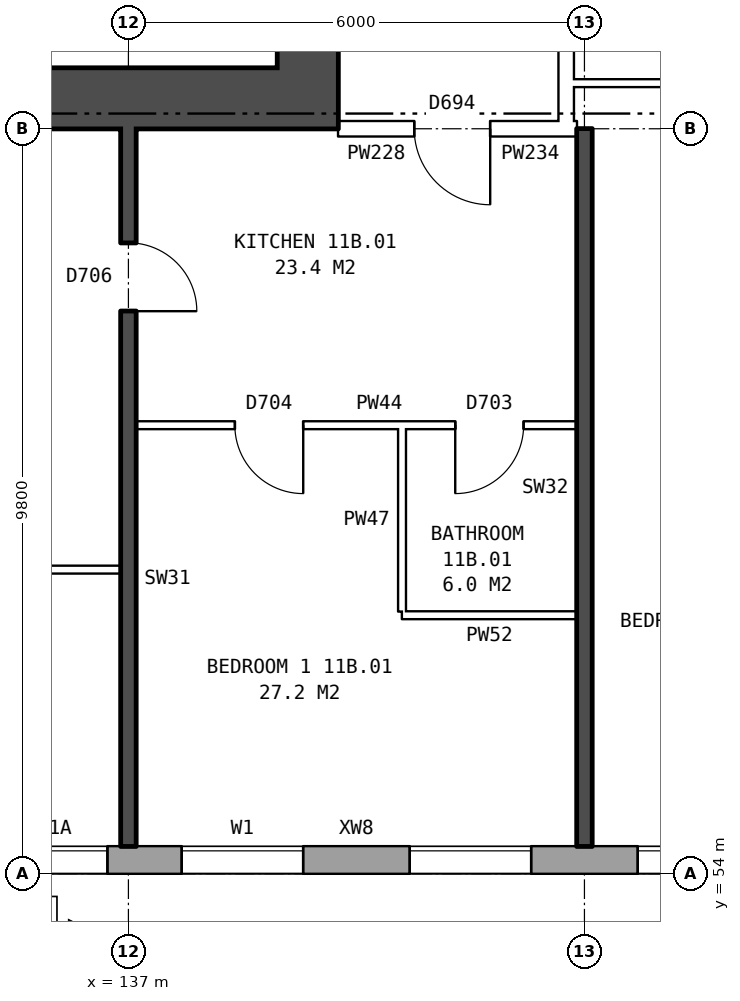
"""IFC4 building model, lengths in metres.
Left out: names, types, materials, properties, quantities, classifications, styles, units other than length and angle.
Written with IfcOpenShell. Run it as: python <this file> out.ifc"""

import sys

from ifc_helpers import new_model, si_unit, direction, frame, frame_2d, origin, place, context, subcontext, project, spatial, rectangle, extrude, element, fill, save


model = new_model("IFC4")
c1 = context("Model", 3, precision=1e-05, world=origin(), true_north=direction((0.0, 1.0)))
c2 = subcontext(c1, "Body", "Model", "MODEL_VIEW")
j1 = project(units=[si_unit("LENGTHUNIT", "METRE"), si_unit("PLANEANGLEUNIT", "RADIAN")], contexts=[c1])
p1 = place(None, origin())
s1 = spatial("IfcSite", under=j1, at=p1, CompositionType="ELEMENT")
p2 = place(p1, origin())
s2 = spatial("IfcBuilding", under=s1, at=p2, CompositionType="ELEMENT")
p3 = place(p2, frame((0.0, 0.0, 44.3)))
s3 = spatial("IfcBuildingStorey", under=s2, at=p3, CompositionType="ELEMENT", Elevation=44.3)
p4 = place(p3, frame((134.075, 54.18, 0.0), z_axis=(0.0, 0.0, 1.0), x_axis=(1.0, 0.0, 0.0)))
e1 = element("IfcWall", 1, at=p4, inside=s3, PredefinedType="STANDARD", context=c2, shape_type="SweptSolid", body=[
    extrude(rectangle(XDim=39.351, YDim=0.36, at=frame_2d((19.675, 0.0))), origin(), (0.0, 0.0, 1.0), 2.85),
])
p5 = place(p4, frame((0.3, 0.0, 0.8)))
e2 = element("IfcOpeningElement", 2, at=p5, cuts=e1, PredefinedType="OPENING", context=c2, shape_type="SweptSolid", body=[
    extrude(rectangle(XDim=0.6, YDim=0.9, at=frame_2d((0.3, 0.45))), frame((0.0, 0.19, 0.0), z_axis=(0.0, -1.0, 0.0), x_axis=(1.0, 0.0, 0.0)), (0.0, 0.0, 1.0), 0.38),
])
p6 = place(p4, frame((3.625, 0.0, 0.8)))
e3 = element("IfcOpeningElement", 3, at=p6, cuts=e1, PredefinedType="OPENING", context=c2, shape_type="SweptSolid", body=[
    extrude(rectangle(XDim=1.6, YDim=1.8, at=frame_2d((0.8, 0.9))), frame((0.0, 0.19, 0.0), z_axis=(0.0, -1.0, 0.0), x_axis=(1.0, 0.0, 0.0)), (0.0, 0.0, 1.0), 0.38),
])
p7 = place(p4, frame((6.625, 0.0, 0.8)))
e4 = element("IfcOpeningElement", 4, at=p7, cuts=e1, PredefinedType="OPENING", context=c2, shape_type="SweptSolid", body=[
    extrude(rectangle(XDim=1.6, YDim=1.8, at=frame_2d((0.8, 0.9))), frame((0.0, 0.19, 0.0), z_axis=(0.0, -1.0, 0.0), x_axis=(1.0, 0.0, 0.0)), (0.0, 0.0, 1.0), 0.38),
])
p8 = place(p4, frame((9.625, 0.0, 0.8)))
e5 = element("IfcOpeningElement", 5, at=p8, cuts=e1, PredefinedType="OPENING", context=c2, shape_type="SweptSolid", body=[
    extrude(rectangle(XDim=1.6, YDim=1.8, at=frame_2d((0.8, 0.9))), frame((0.0, 0.19, 0.0), z_axis=(0.0, -1.0, 0.0), x_axis=(1.0, 0.0, 0.0)), (0.0, 0.0, 1.0), 0.38),
])
p9 = place(p4, frame((12.625, 0.0, 0.8)))
e6 = element("IfcOpeningElement", 6, at=p9, cuts=e1, PredefinedType="OPENING", context=c2, shape_type="SweptSolid", body=[
    extrude(rectangle(XDim=1.6, YDim=1.8, at=frame_2d((0.8, 0.9))), frame((0.0, 0.19, 0.0), z_axis=(0.0, -1.0, 0.0), x_axis=(1.0, 0.0, 0.0)), (0.0, 0.0, 1.0), 0.38),
])
p10 = place(p4, frame((15.625, 0.0, 0.8)))
e7 = element("IfcOpeningElement", 7, at=p10, cuts=e1, PredefinedType="OPENING", context=c2, shape_type="SweptSolid", body=[
    extrude(rectangle(XDim=1.6, YDim=1.8, at=frame_2d((0.8, 0.9))), frame((0.0, 0.19, 0.0), z_axis=(0.0, -1.0, 0.0), x_axis=(1.0, 0.0, 0.0)), (0.0, 0.0, 1.0), 0.38),
])
p11 = place(p4, frame((18.625, 0.0, 0.8)))
e8 = element("IfcOpeningElement", 8, at=p11, cuts=e1, PredefinedType="OPENING", context=c2, shape_type="SweptSolid", body=[
    extrude(rectangle(XDim=1.6, YDim=1.8, at=frame_2d((0.8, 0.9))), frame((0.0, 0.19, 0.0), z_axis=(0.0, -1.0, 0.0), x_axis=(1.0, 0.0, 0.0)), (0.0, 0.0, 1.0), 0.38),
])
p12 = place(p4, frame((21.625, 0.0, 0.8)))
e9 = element("IfcOpeningElement", 9, at=p12, cuts=e1, PredefinedType="OPENING", context=c2, shape_type="SweptSolid", body=[
    extrude(rectangle(XDim=1.6, YDim=1.8, at=frame_2d((0.8, 0.9))), frame((0.0, 0.19, 0.0), z_axis=(0.0, -1.0, 0.0), x_axis=(1.0, 0.0, 0.0)), (0.0, 0.0, 1.0), 0.38),
])
p13 = place(p4, frame((24.625, 0.0, 0.8)))
e10 = element("IfcOpeningElement", 10, at=p13, cuts=e1, PredefinedType="OPENING", context=c2, shape_type="SweptSolid", body=[
    extrude(rectangle(XDim=1.6, YDim=1.8, at=frame_2d((0.8, 0.9))), frame((0.0, 0.19, 0.0), z_axis=(0.0, -1.0, 0.0), x_axis=(1.0, 0.0, 0.0)), (0.0, 0.0, 1.0), 0.38),
])
p14 = place(p4, frame((27.625, 0.0, 0.8)))
e11 = element("IfcOpeningElement", 11, at=p14, cuts=e1, PredefinedType="OPENING", context=c2, shape_type="SweptSolid", body=[
    extrude(rectangle(XDim=1.6, YDim=1.8, at=frame_2d((0.8, 0.9))), frame((0.0, 0.19, 0.0), z_axis=(0.0, -1.0, 0.0), x_axis=(1.0, 0.0, 0.0)), (0.0, 0.0, 1.0), 0.38),
])
p15 = place(p4, frame((30.625, 0.0, 0.8)))
e12 = element("IfcOpeningElement", 12, at=p15, cuts=e1, PredefinedType="OPENING", context=c2, shape_type="SweptSolid", body=[
    extrude(rectangle(XDim=1.6, YDim=1.8, at=frame_2d((0.8, 0.9))), frame((0.0, 0.19, 0.0), z_axis=(0.0, -1.0, 0.0), x_axis=(1.0, 0.0, 0.0)), (0.0, 0.0, 1.0), 0.38),
])
p16 = place(p4, frame((33.625, 0.0, 0.8)))
e13 = element("IfcOpeningElement", 13, at=p16, cuts=e1, PredefinedType="OPENING", context=c2, shape_type="SweptSolid", body=[
    extrude(rectangle(XDim=1.6, YDim=1.8, at=frame_2d((0.8, 0.9))), frame((0.0, 0.19, 0.0), z_axis=(0.0, -1.0, 0.0), x_axis=(1.0, 0.0, 0.0)), (0.0, 0.0, 1.0), 0.38),
])
p17 = place(p4, frame((36.625, 0.0, 0.8)))
e14 = element("IfcOpeningElement", 14, at=p17, cuts=e1, PredefinedType="OPENING", context=c2, shape_type="SweptSolid", body=[
    extrude(rectangle(XDim=1.6, YDim=1.8, at=frame_2d((0.8, 0.9))), frame((0.0, 0.19, 0.0), z_axis=(0.0, -1.0, 0.0), x_axis=(1.0, 0.0, 0.0)), (0.0, 0.0, 1.0), 0.38),
])
p18 = place(p4, frame((1.25, 0.0, 0.8)))
e15 = element("IfcOpeningElement", 15, at=p18, cuts=e1, PredefinedType="OPENING", context=c2, shape_type="SweptSolid", body=[
    extrude(rectangle(XDim=1.4, YDim=1.8, at=frame_2d((0.7, 0.9))), frame((0.0, 0.19, 0.0), z_axis=(0.0, -1.0, 0.0), x_axis=(1.0, 0.0, 0.0)), (0.0, 0.0, 1.0), 0.38),
])
p19 = place(p3, frame((139.36, 64.6, 0.0), z_axis=(0.0, 0.0, 1.0), x_axis=(0.0, 1.0, 0.0)))
e16 = element("IfcWall", 16, at=p19, inside=s3, PredefinedType="SHEAR", context=c2, shape_type="SweptSolid", body=[
    extrude(rectangle(XDim=10.8, YDim=0.8, at=frame_2d((5.4, 0.0))), origin(), (0.0, 0.0, 1.0), 2.85),
])
p20 = place(p19, frame((0.525, 0.0, 0.0)))
e17 = element("IfcOpeningElement", 17, at=p20, cuts=e16, PredefinedType="OPENING", context=c2, shape_type="SweptSolid", body=[
    extrude(rectangle(XDim=1.1, YDim=2.1, at=frame_2d((0.55, 1.05))), frame((0.0, 0.41, 0.0), z_axis=(0.0, -1.0, 0.0), x_axis=(1.0, 0.0, 0.0)), (0.0, 0.0, 1.0), 0.82),
])
p21 = place(p19, frame((9.1, 0.0, 0.0)))
e18 = element("IfcOpeningElement", 18, at=p21, cuts=e16, PredefinedType="OPENING", context=c2, shape_type="SweptSolid", body=[
    extrude(rectangle(XDim=1.1, YDim=2.1, at=frame_2d((0.55, 1.05))), frame((0.0, 0.41, 0.0), z_axis=(0.0, -1.0, 0.0), x_axis=(1.0, 0.0, 0.0)), (0.0, 0.0, 1.0), 0.82),
])
p22 = place(p19, frame((7.325, 0.0, 0.0)))
e19 = element("IfcOpeningElement", 19, at=p22, cuts=e16, PredefinedType="OPENING", context=c2, shape_type="SweptSolid", body=[
    extrude(rectangle(XDim=0.85, YDim=2.1, at=frame_2d((0.425, 1.05))), frame((0.0, 0.41, 0.0), z_axis=(0.0, -1.0, 0.0), x_axis=(1.0, 0.0, 0.0)), (0.0, 0.0, 1.0), 0.82),
])
p23 = place(p3, frame((139.76, 64.2, 0.0), z_axis=(0.0, 0.0, 1.0), x_axis=(-1.0, 0.0, 0.0)))
e20 = element("IfcWall", 20, at=p23, inside=s3, PredefinedType="SHEAR", context=c2, shape_type="SweptSolid", body=[
    extrude(rectangle(XDim=8.4, YDim=0.8, at=frame_2d((4.2, 0.0))), origin(), (0.0, 0.0, 1.0), 2.85),
])
p24 = place(p3, frame((142.76, 63.9, 0.0), z_axis=(0.0, 0.0, 1.0), x_axis=(0.0, 1.0, 0.0)))
e21 = element("IfcWall", 21, at=p24, inside=s3, PredefinedType="PARTITIONING", context=c2, shape_type="SweptSolid", body=[
    extrude(rectangle(XDim=12.2, YDim=0.2, at=frame_2d((6.1, 0.0))), origin(), (0.0, 0.0, 1.0), 2.85),
])
p25 = place(p24, frame((5.1, 0.0, 0.0)))
e22 = element("IfcOpeningElement", 22, at=p25, cuts=e21, PredefinedType="OPENING", context=c2, shape_type="SweptSolid", body=[
    extrude(rectangle(XDim=2.0, YDim=2.1, at=frame_2d((1.0, 1.05))), frame((0.0, 0.11, 0.0), z_axis=(0.0, -1.0, 0.0), x_axis=(1.0, 0.0, 0.0)), (0.0, 0.0, 1.0), 0.22),
])
p26 = place(p3, frame((140.6, 57.4, 0.0), z_axis=(0.0, 0.0, 1.0), x_axis=(1.0, 0.0, 0.0)))
e23 = element("IfcWall", 23, at=p26, inside=s3, PredefinedType="PARTITIONING", context=c2, shape_type="SweptSolid", body=[
    extrude(rectangle(XDim=2.3, YDim=0.1, at=frame_2d((1.15, 0.0))), origin(), (0.0, 0.0, 1.0), 2.85),
])
p27 = place(p3, frame((131.36, 58.0, 0.0), z_axis=(0.0, 0.0, 1.0), x_axis=(1.0, 0.0, 0.0)))
e24 = element("IfcWall", 24, at=p27, inside=s3, PredefinedType="PARTITIONING", context=c2, shape_type="SweptSolid", body=[
    extrude(rectangle(XDim=5.54, YDim=0.1, at=frame_2d((2.77, 0.0))), origin(), (0.0, 0.0, 1.0), 2.85),
])
p28 = place(p27, frame((2.32, 0.0, 0.0)))
e25 = element("IfcOpeningElement", 25, at=p28, cuts=e24, PredefinedType="OPENING", context=c2, shape_type="SweptSolid", body=[
    extrude(rectangle(XDim=0.9, YDim=2.1, at=frame_2d((0.45, 1.05))), frame((0.0, 0.06, 0.0), z_axis=(0.0, -1.0, 0.0), x_axis=(1.0, 0.0, 0.0)), (0.0, 0.0, 1.0), 0.12),
])
p29 = place(p3, frame((137.1, 59.9, 0.0), z_axis=(0.0, 0.0, 1.0), x_axis=(1.0, 0.0, 0.0)))
e26 = element("IfcWall", 26, at=p29, inside=s3, PredefinedType="PARTITIONING", context=c2, shape_type="SweptSolid", body=[
    extrude(rectangle(XDim=5.8, YDim=0.1, at=frame_2d((2.9, 0.0))), origin(), (0.0, 0.0, 1.0), 2.85),
])
p30 = place(p29, frame((1.3, 0.0, 0.0)))
e27 = element("IfcOpeningElement", 27, at=p30, cuts=e26, PredefinedType="OPENING", context=c2, shape_type="SweptSolid", body=[
    extrude(rectangle(XDim=0.9, YDim=2.1, at=frame_2d((0.45, 1.05))), frame((0.0, 0.06, 0.0), z_axis=(0.0, -1.0, 0.0), x_axis=(1.0, 0.0, 0.0)), (0.0, 0.0, 1.0), 0.12),
])
p31 = place(p29, frame((4.2, 0.0, 0.0)))
e28 = element("IfcOpeningElement", 28, at=p31, cuts=e26, PredefinedType="OPENING", context=c2, shape_type="SweptSolid", body=[
    extrude(rectangle(XDim=0.9, YDim=2.1, at=frame_2d((0.45, 1.05))), frame((0.0, 0.06, 0.0), z_axis=(0.0, -1.0, 0.0), x_axis=(1.0, 0.0, 0.0)), (0.0, 0.0, 1.0), 0.12),
])
p32 = place(p3, frame((139.76, 63.8, 0.0), z_axis=(0.0, 0.0, 1.0), x_axis=(1.0, 0.0, 0.0)))
e29 = element("IfcWall", 29, at=p32, inside=s3, PredefinedType="PARTITIONING", context=c2, shape_type="SweptSolid", body=[
    extrude(rectangle(XDim=3.0, YDim=0.2, at=frame_2d((1.5, 0.0))), origin(), (0.0, 0.0, 1.0), 2.85),
])
p33 = place(p32, frame((1.0, 0.0, 0.0)))
e30 = element("IfcOpeningElement", 30, at=p33, cuts=e29, PredefinedType="OPENING", context=c2, shape_type="SweptSolid", body=[
    extrude(rectangle(XDim=1.0, YDim=2.1, at=frame_2d((0.5, 1.05))), frame((0.0, 0.11, 0.0), z_axis=(0.0, -1.0, 0.0), x_axis=(1.0, 0.0, 0.0)), (0.0, 0.0, 1.0), 0.22),
])
p34 = place(p3, frame((142.76, 63.8, 0.0), z_axis=(0.0, 0.0, 1.0), x_axis=(1.0, 0.0, 0.0)))
e31 = element("IfcWall", 31, at=p34, inside=s3, PredefinedType="PARTITIONING", context=c2, shape_type="SweptSolid", body=[
    extrude(rectangle(XDim=0.14, YDim=0.2, at=frame_2d((0.07, 0.0))), origin(), (0.0, 0.0, 1.0), 2.85),
])
p35 = place(p3, frame((142.76, 64.4, 0.0), z_axis=(0.0, 0.0, 1.0), x_axis=(1.0, 0.0, 0.0)))
e32 = element("IfcWall", 32, at=p35, inside=s3, PredefinedType="PARTITIONING", context=c2, shape_type="SweptSolid", body=[
    extrude(rectangle(XDim=3.24, YDim=0.1, at=frame_2d((1.62, 0.0))), origin(), (0.0, 0.0, 1.0), 2.85),
])
p36 = place(p3, frame((137.0, 54.36, 0.0), z_axis=(0.0, 0.0, 1.0), x_axis=(0.0, 1.0, 0.0)))
e33 = element("IfcWall", 33, at=p36, inside=s3, PredefinedType="SOLIDWALL", context=c2, shape_type="SweptSolid", body=[
    extrude(rectangle(XDim=9.44, YDim=0.2, at=frame_2d((4.72, 0.0))), origin(), (0.0, 0.0, 1.0), 2.85),
])
p37 = place(p36, frame((7.04, 0.0, 0.0)))
e34 = element("IfcOpeningElement", 34, at=p37, cuts=e33, PredefinedType="OPENING", context=c2, shape_type="SweptSolid", body=[
    extrude(rectangle(XDim=0.9, YDim=2.1, at=frame_2d((0.45, 1.05))), frame((0.0, 0.11, 0.0), z_axis=(0.0, -1.0, 0.0), x_axis=(1.0, 0.0, 0.0)), (0.0, 0.0, 1.0), 0.22),
])
p38 = place(p3, frame((140.6, 57.45, 0.0), z_axis=(0.0, 0.0, 1.0), x_axis=(0.0, 1.0, 0.0)))
e35 = element("IfcWall", 35, at=p38, inside=s3, PredefinedType="PARTITIONING", context=c2, shape_type="SweptSolid", body=[
    extrude(rectangle(XDim=2.4, YDim=0.1, at=frame_2d((1.2, 0.0))), origin(), (0.0, 0.0, 1.0), 2.85),
])
p39 = place(p3, frame((143.0, 54.36, 0.0), z_axis=(0.0, 0.0, 1.0), x_axis=(0.0, 1.0, 0.0)))
e36 = element("IfcWall", 36, at=p39, inside=s3, PredefinedType="SOLIDWALL", context=c2, shape_type="SweptSolid", body=[
    extrude(rectangle(XDim=9.44, YDim=0.2, at=frame_2d((4.72, 0.0))), origin(), (0.0, 0.0, 1.0), 2.85),
])
p40 = place(p6, origin())
e37 = element("IfcWindow", 37, at=p40, inside=s3, PartitioningType="SINGLE_PANEL", PredefinedType="WINDOW", context=c2, shape_type="SweptSolid", body=[
    extrude(rectangle(XDim=1.6, YDim=1.8, at=frame_2d((0.8, 0.9))), frame((0.0, 0.15, 0.0), z_axis=(0.0, -1.0, 0.0), x_axis=(1.0, 0.0, 0.0)), (0.0, 0.0, 1.0), 0.06),
])
fill(e3, e37)
p41 = place(p7, origin())
e38 = element("IfcWindow", 38, at=p41, inside=s3, PartitioningType="SINGLE_PANEL", PredefinedType="WINDOW", context=c2, shape_type="SweptSolid", body=[
    extrude(rectangle(XDim=1.6, YDim=1.8, at=frame_2d((0.8, 0.9))), frame((0.0, 0.15, 0.0), z_axis=(0.0, -1.0, 0.0), x_axis=(1.0, 0.0, 0.0)), (0.0, 0.0, 1.0), 0.06),
])
fill(e4, e38)
p42 = place(p8, origin())
e39 = element("IfcWindow", 39, at=p42, inside=s3, PartitioningType="SINGLE_PANEL", PredefinedType="WINDOW", context=c2, shape_type="SweptSolid", body=[
    extrude(rectangle(XDim=1.6, YDim=1.8, at=frame_2d((0.8, 0.9))), frame((0.0, 0.15, 0.0), z_axis=(0.0, -1.0, 0.0), x_axis=(1.0, 0.0, 0.0)), (0.0, 0.0, 1.0), 0.06),
])
fill(e5, e39)
p43 = place(p30, frame((0.9, 0.0, 0.0), z_axis=(0.0, 0.0, 1.0), x_axis=(-1.0, 0.0, 0.0)))
e40 = element("IfcDoor", 40, at=p43, inside=s3, OperationType="SINGLE_SWING_LEFT", PredefinedType="DOOR", context=c2, shape_type="SweptSolid", body=[
    extrude(rectangle(XDim=0.9, YDim=2.1, at=frame_2d((0.45, 1.05))), frame((0.0, 0.025, 0.0), z_axis=(0.0, -1.0, 0.0), x_axis=(1.0, 0.0, 0.0)), (0.0, 0.0, 1.0), 0.05),
])
fill(e27, e40)
p44 = place(p33, frame((1.0, 0.0, 0.0), z_axis=(0.0, 0.0, 1.0), x_axis=(-1.0, 0.0, 0.0)))
e41 = element("IfcDoor", 41, at=p44, inside=s3, OperationType="SINGLE_SWING_LEFT", PredefinedType="DOOR", context=c2, shape_type="SweptSolid", body=[
    extrude(rectangle(XDim=1.0, YDim=2.1, at=frame_2d((0.5, 1.05))), frame((0.0, 0.025, 0.0), z_axis=(0.0, -1.0, 0.0), x_axis=(1.0, 0.0, 0.0)), (0.0, 0.0, 1.0), 0.05),
])
fill(e30, e41)
p45 = place(p37, frame((0.9, 0.0, 0.0), z_axis=(0.0, 0.0, 1.0), x_axis=(-1.0, 0.0, 0.0)))
e42 = element("IfcDoor", 42, at=p45, inside=s3, OperationType="SINGLE_SWING_RIGHT", PredefinedType="DOOR", context=c2, shape_type="SweptSolid", body=[
    extrude(rectangle(XDim=0.9, YDim=2.1, at=frame_2d((0.45, 1.05))), frame((0.0, 0.025, 0.0), z_axis=(0.0, -1.0, 0.0), x_axis=(1.0, 0.0, 0.0)), (0.0, 0.0, 1.0), 0.05),
])
fill(e34, e42)
p46 = place(p31, frame((0.9, 0.0, 0.0), z_axis=(0.0, 0.0, 1.0), x_axis=(-1.0, 0.0, 0.0)))
e43 = element("IfcDoor", 43, at=p46, inside=s3, OperationType="SINGLE_SWING_RIGHT", PredefinedType="DOOR", context=c2, shape_type="SweptSolid", body=[
    extrude(rectangle(XDim=0.9, YDim=2.1, at=frame_2d((0.45, 1.05))), frame((0.0, 0.025, 0.0), z_axis=(0.0, -1.0, 0.0), x_axis=(1.0, 0.0, 0.0)), (0.0, 0.0, 1.0), 0.05),
])
fill(e28, e43)
p47 = place(p18, origin())
e44 = element("IfcWindow", 44, at=p47, inside=s3, PartitioningType="SINGLE_PANEL", PredefinedType="WINDOW", context=c2, shape_type="SweptSolid", body=[
    extrude(rectangle(XDim=1.4, YDim=1.8, at=frame_2d((0.7, 0.9))), frame((0.0, 0.15, 0.0), z_axis=(0.0, -1.0, 0.0), x_axis=(1.0, 0.0, 0.0)), (0.0, 0.0, 1.0), 0.06),
])
fill(e15, e44)
save(model, sys.argv[1])
